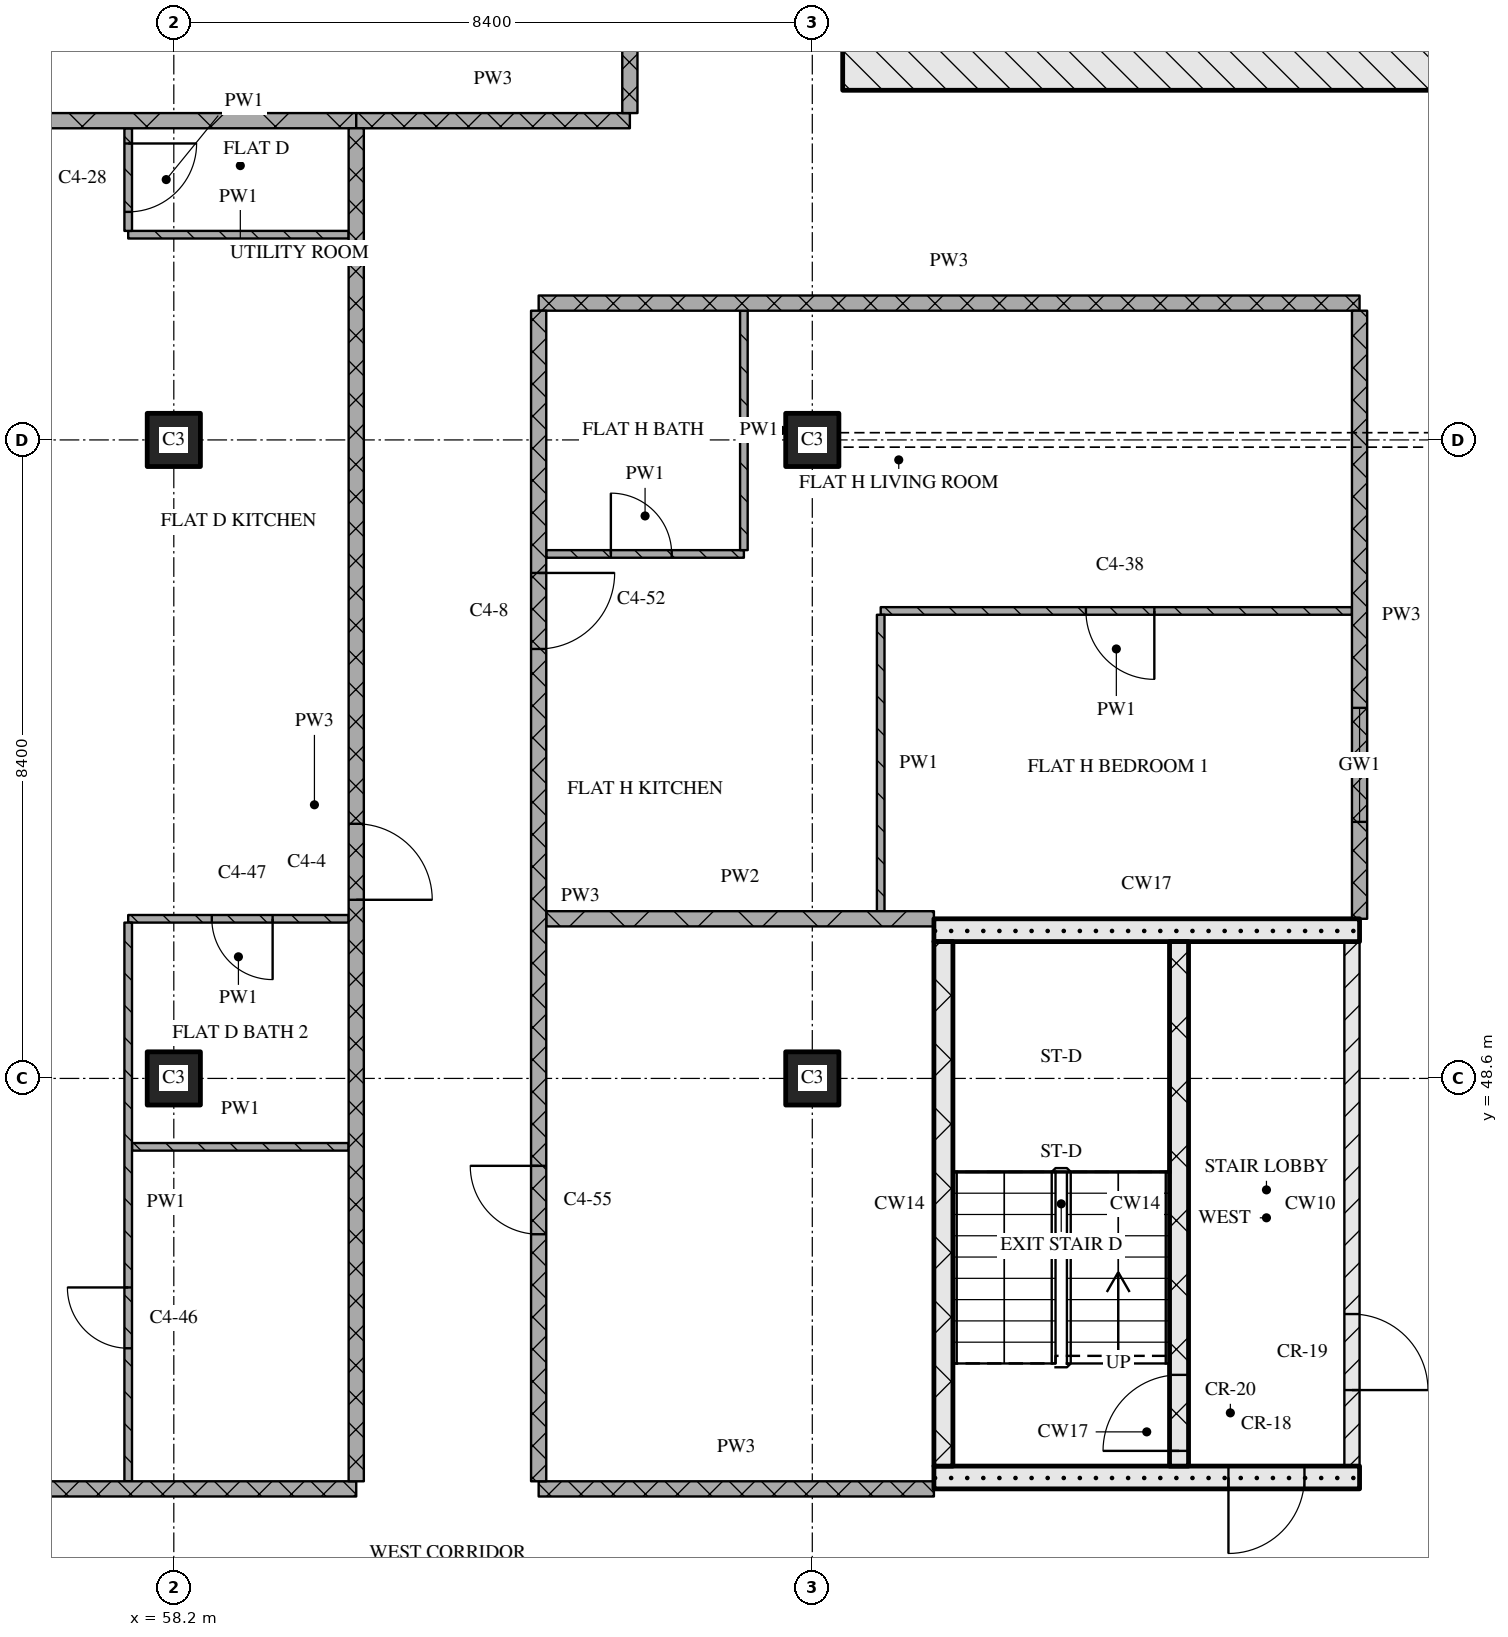
"""IFC4 building model, lengths in metres.
Left out: names, types, materials, properties, quantities, classifications, styles, units other than length and angle.
Written with IfcOpenShell. Run it as: python <this file> out.ifc"""

import sys

from ifc_helpers import new_model, si_unit, direction, frame, frame_2d, origin, origin_2d, place, context, subcontext, project, spatial, rectangle, extrude, element, fill, save


model = new_model("IFC4")
c1 = context("Model", 3, precision=1e-05, world=origin(), true_north=direction((0.0, 1.0)))
c2 = subcontext(c1, "Body", "Model", "MODEL_VIEW")
j1 = project(units=[si_unit("LENGTHUNIT", "METRE"), si_unit("PLANEANGLEUNIT", "RADIAN")], contexts=[c1])
p1 = place(None, origin())
s1 = spatial("IfcSite", under=j1, at=p1, CompositionType="ELEMENT")
p2 = place(p1, origin())
s2 = spatial("IfcBuilding", under=s1, at=p2, CompositionType="ELEMENT")
p3 = place(p2, frame((0.0, 0.0, 183.45)))
s3 = spatial("IfcBuildingStorey", under=s2, at=p3, CompositionType="ELEMENT", Elevation=183.45)
for number, where, z_axis, x_axis in (
    (1, (58.2, 48.6, 0.0), (0.0, 0.0, 1.0), (1.0, 0.0, 0.0)),
    (2, (58.2, 57.0, 0.0), (0.0, 0.0, 1.0), (1.0, 0.0, 0.0)),
    (3, (66.6, 48.6, 0.0), (0.0, 0.0, 1.0), (1.0, 0.0, 0.0)),
    (4, (66.6, 57.0, 0.0), (0.0, 0.0, 1.0), (1.0, 0.0, 0.0)),
):
    element("IfcColumn", number, at=place(p3, frame(where, z_axis=z_axis, x_axis=x_axis)), inside=s3, PredefinedType="COLUMN", context=c2, shape_type="SweptSolid", body=[
        extrude(rectangle(XDim=0.7, YDim=0.7, at=origin_2d()), origin(), (0.0, 0.0, 1.0), 3.6),
    ])
p4 = place(p3, frame((67.0, 62.0, 0.0), z_axis=(0.0, 0.0, 1.0), x_axis=(1.0, 0.0, 0.0)))
e5 = element("IfcWall", 5, at=p4, inside=s3, PredefinedType="SOLIDWALL", context=c2, shape_type="SweptSolid", body=[
    extrude(rectangle(XDim=41.2, YDim=0.8, at=frame_2d((20.6, 0.0))), origin(), (0.0, 0.0, 1.0), 3.32),
])
p5 = place(p4, frame((20.95, 0.0, 0.0)))
e6 = element("IfcOpeningElement", 6, at=p5, cuts=e5, PredefinedType="OPENING", context=c2, shape_type="SweptSolid", body=[
    extrude(rectangle(XDim=1.8, YDim=2.1, at=frame_2d((0.9, 1.05))), frame((0.0, 0.41, 0.0), z_axis=(0.0, -1.0, 0.0), x_axis=(1.0, 0.0, 0.0)), (0.0, 0.0, 1.0), 0.82),
])
p6 = place(p3, frame((68.2, 43.35, 0.0), z_axis=(0.0, 0.0, 1.0), x_axis=(1.0, 0.0, 0.0)))
e7 = element("IfcWall", 7, at=p6, inside=s3, PredefinedType="SOLIDWALL", context=c2, shape_type="SweptSolid", body=[
    extrude(rectangle(XDim=5.6, YDim=0.3, at=frame_2d((2.8, 0.0))), origin(), (0.0, 0.0, 1.0), 3.32),
])
p7 = place(p6, frame((3.875, 0.0, 0.0)))
e8 = element("IfcOpeningElement", 8, at=p7, cuts=e7, PredefinedType="OPENING", context=c2, shape_type="SweptSolid", body=[
    extrude(rectangle(XDim=1.0, YDim=2.1, at=frame_2d((0.5, 1.05))), frame((0.0, 0.16, 0.0), z_axis=(0.0, -1.0, 0.0), x_axis=(1.0, 0.0, 0.0)), (0.0, 0.0, 1.0), 0.32),
])
p8 = place(p3, frame((68.325, 43.5, 0.0), z_axis=(0.0, 0.0, 1.0), x_axis=(0.0, 1.0, 0.0)))
e9 = element("IfcWall", 9, at=p8, inside=s3, PredefinedType="SOLIDWALL", context=c2, shape_type="SweptSolid", body=[
    extrude(rectangle(XDim=6.9, YDim=0.25, at=frame_2d((3.45, 0.0))), origin(), (0.0, 0.0, 1.0), 3.32),
])
p9 = place(p3, frame((71.425, 43.5, 0.0), z_axis=(0.0, 0.0, 1.0), x_axis=(0.0, 1.0, 0.0)))
e10 = element("IfcWall", 10, at=p9, inside=s3, PredefinedType="SOLIDWALL", context=c2, shape_type="SweptSolid", body=[
    extrude(rectangle(XDim=6.9, YDim=0.25, at=frame_2d((3.45, 0.0))), origin(), (0.0, 0.0, 1.0), 3.32),
])
p10 = place(p9, frame((0.2, 0.0, 0.0)))
e11 = element("IfcOpeningElement", 11, at=p10, cuts=e10, PredefinedType="OPENING", context=c2, shape_type="SweptSolid", body=[
    extrude(rectangle(XDim=1.0, YDim=2.1, at=frame_2d((0.5, 1.05))), frame((0.0, 0.135, 0.0), z_axis=(0.0, -1.0, 0.0), x_axis=(1.0, 0.0, 0.0)), (0.0, 0.0, 1.0), 0.27),
])
p11 = place(p3, frame((73.7, 43.5, 0.0), z_axis=(0.0, 0.0, 1.0), x_axis=(0.0, 1.0, 0.0)))
e12 = element("IfcWall", 12, at=p11, inside=s3, PredefinedType="PARTITIONING", context=c2, shape_type="SweptSolid", body=[
    extrude(rectangle(XDim=6.9, YDim=0.2, at=frame_2d((3.45, 0.0))), origin(), (0.0, 0.0, 1.0), 3.32),
])
p12 = place(p11, frame((1.0, 0.0, 0.0)))
e13 = element("IfcOpeningElement", 13, at=p12, cuts=e12, PredefinedType="OPENING", context=c2, shape_type="SweptSolid", body=[
    extrude(rectangle(XDim=1.0, YDim=2.1, at=frame_2d((0.5, 1.05))), frame((0.0, 0.11, 0.0), z_axis=(0.0, -1.0, 0.0), x_axis=(1.0, 0.0, 0.0)), (0.0, 0.0, 1.0), 0.22),
])
p13 = place(p3, frame((68.2, 50.55, 0.0), z_axis=(0.0, 0.0, 1.0), x_axis=(1.0, 0.0, 0.0)))
e14 = element("IfcWall", 14, at=p13, inside=s3, PredefinedType="SOLIDWALL", context=c2, shape_type="SweptSolid", body=[
    extrude(rectangle(XDim=5.6, YDim=0.3, at=frame_2d((2.8, 0.0))), origin(), (0.0, 0.0, 1.0), 3.32),
])
p14 = place(p3, frame((48.28, 43.2, 0.0), z_axis=(0.0, 0.0, 1.0), x_axis=(1.0, 0.0, 0.0)))
e15 = element("IfcWall", 15, at=p14, inside=s3, PredefinedType="PARTITIONING", context=c2, shape_type="SweptSolid", body=[
    extrude(rectangle(XDim=12.32, YDim=0.2, at=frame_2d((6.16, 0.0))), origin(), (0.0, 0.0, 1.0), 3.32),
])
p15 = place(p3, frame((63.0, 43.2, 0.0), z_axis=(0.0, 0.0, 1.0), x_axis=(1.0, 0.0, 0.0)))
e16 = element("IfcWall", 16, at=p15, inside=s3, PredefinedType="PARTITIONING", context=c2, shape_type="SweptSolid", body=[
    extrude(rectangle(XDim=5.2, YDim=0.2, at=frame_2d((2.6, 0.0))), origin(), (0.0, 0.0, 1.0), 3.32),
])
p16 = place(p3, frame((57.65, 47.7, 0.0), z_axis=(0.0, 0.0, 1.0), x_axis=(1.0, 0.0, 0.0)))
e17 = element("IfcWall", 17, at=p16, inside=s3, PredefinedType="PARTITIONING", context=c2, shape_type="SweptSolid", body=[
    extrude(rectangle(XDim=2.85, YDim=0.1, at=frame_2d((1.425, 0.0))), origin(), (0.0, 0.0, 1.0), 3.32),
])
p17 = place(p3, frame((63.1, 50.7, 0.0), z_axis=(0.0, 0.0, 1.0), x_axis=(1.0, 0.0, 0.0)))
e18 = element("IfcWall", 18, at=p17, inside=s3, PredefinedType="PARTITIONING", context=c2, shape_type="SweptSolid", body=[
    extrude(rectangle(XDim=5.1, YDim=0.2, at=frame_2d((2.55, 0.0))), origin(), (0.0, 0.0, 1.0), 3.32),
])
p18 = place(p3, frame((60.5, 50.7, 0.0), z_axis=(0.0, 0.0, 1.0), x_axis=(-1.0, 0.0, 0.0)))
e19 = element("IfcWall", 19, at=p18, inside=s3, PredefinedType="PARTITIONING", context=c2, shape_type="SweptSolid", body=[
    extrude(rectangle(XDim=2.9, YDim=0.1, at=frame_2d((1.45, 0.0))), origin(), (0.0, 0.0, 1.0), 3.32),
])
p19 = place(p18, frame((1.0, 0.0, 0.0)))
e20 = element("IfcOpeningElement", 20, at=p19, cuts=e19, PredefinedType="OPENING", context=c2, shape_type="SweptSolid", body=[
    extrude(rectangle(XDim=0.8, YDim=2.1, at=frame_2d((0.4, 1.05))), frame((0.0, 0.06, 0.0), z_axis=(0.0, -1.0, 0.0), x_axis=(1.0, 0.0, 0.0)), (0.0, 0.0, 1.0), 0.12),
])
p20 = place(p3, frame((73.7, 54.75, 0.0), z_axis=(0.0, 0.0, 1.0), x_axis=(-1.0, 0.0, 0.0)))
e21 = element("IfcWall", 21, at=p20, inside=s3, PredefinedType="PARTITIONING", context=c2, shape_type="SweptSolid", body=[
    extrude(rectangle(XDim=6.2, YDim=0.1, at=frame_2d((3.1, 0.0))), origin(), (0.0, 0.0, 1.0), 3.32),
])
p21 = place(p20, frame((2.6, 0.0, 0.0)))
e22 = element("IfcOpeningElement", 22, at=p21, cuts=e21, PredefinedType="OPENING", context=c2, shape_type="SweptSolid", body=[
    extrude(rectangle(XDim=0.9, YDim=2.1, at=frame_2d((0.45, 1.05))), frame((0.0, 0.06, 0.0), z_axis=(0.0, -1.0, 0.0), x_axis=(1.0, 0.0, 0.0)), (0.0, 0.0, 1.0), 0.12),
])
p22 = place(p3, frame((63.1, 55.5, 0.0), z_axis=(0.0, 0.0, 1.0), x_axis=(1.0, 0.0, 0.0)))
e23 = element("IfcWall", 23, at=p22, inside=s3, PredefinedType="PARTITIONING", context=c2, shape_type="SweptSolid", body=[
    extrude(rectangle(XDim=2.6, YDim=0.1, at=frame_2d((1.3, 0.0))), origin(), (0.0, 0.0, 1.0), 3.32),
])
p23 = place(p22, frame((0.85, 0.0, 0.0)))
e24 = element("IfcOpeningElement", 24, at=p23, cuts=e23, PredefinedType="OPENING", context=c2, shape_type="SweptSolid", body=[
    extrude(rectangle(XDim=0.8, YDim=2.1, at=frame_2d((0.4, 1.05))), frame((0.0, 0.06, 0.0), z_axis=(0.0, -1.0, 0.0), x_axis=(1.0, 0.0, 0.0)), (0.0, 0.0, 1.0), 0.12),
])
p24 = place(p3, frame((63.0, 58.8, 0.0), z_axis=(0.0, 0.0, 1.0), x_axis=(1.0, 0.0, 0.0)))
e25 = element("IfcWall", 25, at=p24, inside=s3, PredefinedType="PARTITIONING", context=c2, shape_type="SweptSolid", body=[
    extrude(rectangle(XDim=10.8, YDim=0.2, at=frame_2d((5.4, 0.0))), origin(), (0.0, 0.0, 1.0), 3.32),
])
p25 = place(p3, frame((57.6, 59.7, 0.0), z_axis=(0.0, 0.0, 1.0), x_axis=(1.0, 0.0, 0.0)))
e26 = element("IfcWall", 26, at=p25, inside=s3, PredefinedType="PARTITIONING", context=c2, shape_type="SweptSolid", body=[
    extrude(rectangle(XDim=2.9, YDim=0.1, at=frame_2d((1.45, 0.0))), origin(), (0.0, 0.0, 1.0), 3.32),
])
p26 = place(p3, frame((60.6, 61.2, 0.0), z_axis=(0.0, 0.0, 1.0), x_axis=(1.0, 0.0, 0.0)))
e27 = element("IfcWall", 27, at=p26, inside=s3, PredefinedType="PARTITIONING", context=c2, shape_type="SweptSolid", body=[
    extrude(rectangle(XDim=3.6, YDim=0.2, at=frame_2d((1.8, 0.0))), origin(), (0.0, 0.0, 1.0), 3.32),
])
p27 = place(p3, frame((48.28, 61.2, 0.0), z_axis=(0.0, 0.0, 1.0), x_axis=(1.0, 0.0, 0.0)))
e28 = element("IfcWall", 28, at=p27, inside=s3, PredefinedType="PARTITIONING", context=c2, shape_type="SweptSolid", body=[
    extrude(rectangle(XDim=12.32, YDim=0.2, at=frame_2d((6.16, 0.0))), origin(), (0.0, 0.0, 1.0), 3.32),
])
p28 = place(p3, frame((57.6, 50.65, 0.0), z_axis=(0.0, 0.0, 1.0), x_axis=(0.0, -1.0, 0.0)))
e29 = element("IfcWall", 29, at=p28, inside=s3, PredefinedType="PARTITIONING", context=c2, shape_type="SweptSolid", body=[
    extrude(rectangle(XDim=7.35, YDim=0.1, at=frame_2d((3.675, 0.0))), origin(), (0.0, 0.0, 1.0), 3.32),
])
p29 = place(p28, frame((4.8, 0.0, 0.0)))
e30 = element("IfcOpeningElement", 30, at=p29, cuts=e29, PredefinedType="OPENING", context=c2, shape_type="SweptSolid", body=[
    extrude(rectangle(XDim=0.8, YDim=2.1, at=frame_2d((0.4, 1.05))), frame((0.0, 0.06, 0.0), z_axis=(0.0, -1.0, 0.0), x_axis=(1.0, 0.0, 0.0)), (0.0, 0.0, 1.0), 0.12),
])
p30 = place(p3, frame((57.6, 61.1, 0.0), z_axis=(0.0, 0.0, 1.0), x_axis=(0.0, -1.0, 0.0)))
e31 = element("IfcWall", 31, at=p30, inside=s3, PredefinedType="PARTITIONING", context=c2, shape_type="SweptSolid", body=[
    extrude(rectangle(XDim=1.35, YDim=0.1, at=frame_2d((0.675, 0.0))), origin(), (0.0, 0.0, 1.0), 3.32),
])
p31 = place(p30, frame((0.2, 0.0, 0.0)))
e32 = element("IfcOpeningElement", 32, at=p31, cuts=e31, PredefinedType="OPENING", context=c2, shape_type="SweptSolid", body=[
    extrude(rectangle(XDim=0.9, YDim=2.1, at=frame_2d((0.45, 1.05))), frame((0.0, 0.06, 0.0), z_axis=(0.0, -1.0, 0.0), x_axis=(1.0, 0.0, 0.0)), (0.0, 0.0, 1.0), 0.12),
])
p32 = place(p3, frame((60.6, 43.3, 0.0), z_axis=(0.0, 0.0, 1.0), x_axis=(0.0, 1.0, 0.0)))
e33 = element("IfcWall", 33, at=p32, inside=s3, PredefinedType="PARTITIONING", context=c2, shape_type="SweptSolid", body=[
    extrude(rectangle(XDim=17.8, YDim=0.2, at=frame_2d((8.9, 0.0))), origin(), (0.0, 0.0, 1.0), 3.32),
])
p33 = place(p32, frame((7.65, 0.0, 0.0)))
e34 = element("IfcOpeningElement", 34, at=p33, cuts=e33, PredefinedType="OPENING", context=c2, shape_type="SweptSolid", body=[
    extrude(rectangle(XDim=1.0, YDim=2.1, at=frame_2d((0.5, 1.05))), frame((0.0, 0.11, 0.0), z_axis=(0.0, -1.0, 0.0), x_axis=(1.0, 0.0, 0.0)), (0.0, 0.0, 1.0), 0.22),
])
p34 = place(p3, frame((63.0, 58.7, 0.0), z_axis=(0.0, 0.0, 1.0), x_axis=(0.0, -1.0, 0.0)))
e35 = element("IfcWall", 35, at=p34, inside=s3, PredefinedType="PARTITIONING", context=c2, shape_type="SweptSolid", body=[
    extrude(rectangle(XDim=15.4, YDim=0.2, at=frame_2d((7.7, 0.0))), origin(), (0.0, 0.0, 1.0), 3.32),
])
p35 = place(p34, frame((3.45, 0.0, 0.0)))
e36 = element("IfcOpeningElement", 36, at=p35, cuts=e35, PredefinedType="OPENING", context=c2, shape_type="SweptSolid", body=[
    extrude(rectangle(XDim=1.0, YDim=2.1, at=frame_2d((0.5, 1.05))), frame((0.0, 0.11, 0.0), z_axis=(0.0, -1.0, 0.0), x_axis=(1.0, 0.0, 0.0)), (0.0, 0.0, 1.0), 0.22),
])
p36 = place(p34, frame((11.25, 0.0, 0.0)))
e37 = element("IfcOpeningElement", 37, at=p36, cuts=e35, PredefinedType="OPENING", context=c2, shape_type="SweptSolid", body=[
    extrude(rectangle(XDim=0.9, YDim=2.1, at=frame_2d((0.45, 1.05))), frame((0.0, 0.11, 0.0), z_axis=(0.0, -1.0, 0.0), x_axis=(1.0, 0.0, 0.0)), (0.0, 0.0, 1.0), 0.22),
])
p37 = place(p3, frame((64.2, 61.3, 0.0), z_axis=(0.0, 0.0, 1.0), x_axis=(0.0, 1.0, 0.0)))
e38 = element("IfcWall", 38, at=p37, inside=s3, PredefinedType="PARTITIONING", context=c2, shape_type="SweptSolid", body=[
    extrude(rectangle(XDim=14.02, YDim=0.2, at=frame_2d((7.01, 0.0))), origin(), (0.0, 0.0, 1.0), 3.32),
])
p38 = place(p37, frame((3.45, 0.0, 0.0)))
e39 = element("IfcOpeningElement", 39, at=p38, cuts=e38, PredefinedType="OPENING", context=c2, shape_type="SweptSolid", body=[
    extrude(rectangle(XDim=1.0, YDim=2.1, at=frame_2d((0.5, 1.05))), frame((0.0, 0.11, 0.0), z_axis=(0.0, -1.0, 0.0), x_axis=(1.0, 0.0, 0.0)), (0.0, 0.0, 1.0), 0.22),
])
p39 = place(p3, frame((65.7, 58.7, 0.0), z_axis=(0.0, 0.0, 1.0), x_axis=(0.0, -1.0, 0.0)))
e40 = element("IfcWall", 40, at=p39, inside=s3, PredefinedType="PARTITIONING", context=c2, shape_type="SweptSolid", body=[
    extrude(rectangle(XDim=3.15, YDim=0.1, at=frame_2d((1.575, 0.0))), origin(), (0.0, 0.0, 1.0), 3.32),
])
p40 = place(p3, frame((67.5, 54.7, 0.0), z_axis=(0.0, 0.0, 1.0), x_axis=(0.0, -1.0, 0.0)))
e41 = element("IfcWall", 41, at=p40, inside=s3, PredefinedType="PARTITIONING", context=c2, shape_type="SweptSolid", body=[
    extrude(rectangle(XDim=3.9, YDim=0.1, at=frame_2d((1.95, 0.0))), origin(), (0.0, 0.0, 1.0), 3.32),
])
p41 = place(p3, frame((73.8, 58.7, 0.0), z_axis=(0.0, 0.0, 1.0), x_axis=(0.0, -1.0, 0.0)))
e42 = element("IfcWall", 42, at=p41, inside=s3, PredefinedType="PARTITIONING", context=c2, shape_type="SweptSolid", body=[
    extrude(rectangle(XDim=8.0, YDim=0.2, at=frame_2d((4.0, 0.0))), origin(), (0.0, 0.0, 1.0), 3.32),
])
p42 = place(p41, frame((5.225, 0.0, 0.9)))
e43 = element("IfcOpeningElement", 43, at=p42, cuts=e42, PredefinedType="OPENING", context=c2, shape_type="SweptSolid", body=[
    extrude(rectangle(XDim=1.5, YDim=1.5, at=frame_2d((0.75, 0.75))), frame((0.0, 0.11, 0.0), z_axis=(0.0, -1.0, 0.0), x_axis=(1.0, 0.0, 0.0)), (0.0, 0.0, 1.0), 0.22),
])
p43 = place(p7, origin())
e44 = element("IfcDoor", 44, at=p43, inside=s3, OperationType="SINGLE_SWING_RIGHT", PredefinedType="DOOR", context=c2, shape_type="SweptSolid", body=[
    extrude(rectangle(XDim=1.0, YDim=2.1, at=frame_2d((0.5, 1.05))), frame((0.0, 0.025, 0.0), z_axis=(0.0, -1.0, 0.0), x_axis=(1.0, 0.0, 0.0)), (0.0, 0.0, 1.0), 0.05),
])
fill(e8, e44)
p44 = place(p10, origin())
e45 = element("IfcDoor", 45, at=p44, inside=s3, OperationType="SINGLE_SWING_LEFT", PredefinedType="DOOR", context=c2, shape_type="SweptSolid", body=[
    extrude(rectangle(XDim=1.0, YDim=2.1, at=frame_2d((0.5, 1.05))), frame((0.0, 0.025, 0.0), z_axis=(0.0, -1.0, 0.0), x_axis=(1.0, 0.0, 0.0)), (0.0, 0.0, 1.0), 0.05),
])
fill(e11, e45)
p45 = place(p12, origin())
e46 = element("IfcDoor", 46, at=p45, inside=s3, OperationType="SINGLE_SWING_RIGHT", PredefinedType="DOOR", context=c2, shape_type="SweptSolid", body=[
    extrude(rectangle(XDim=1.0, YDim=2.1, at=frame_2d((0.5, 1.05))), frame((0.0, 0.025, 0.0), z_axis=(0.0, -1.0, 0.0), x_axis=(1.0, 0.0, 0.0)), (0.0, 0.0, 1.0), 0.05),
])
fill(e13, e46)
p46 = place(p19, origin())
e47 = element("IfcDoor", 47, at=p46, inside=s3, OperationType="SINGLE_SWING_LEFT", PredefinedType="DOOR", context=c2, shape_type="SweptSolid", body=[
    extrude(rectangle(XDim=0.8, YDim=2.1, at=frame_2d((0.4, 1.05))), frame((0.0, 0.025, 0.0), z_axis=(0.0, -1.0, 0.0), x_axis=(1.0, 0.0, 0.0)), (0.0, 0.0, 1.0), 0.05),
])
fill(e20, e47)
p47 = place(p21, origin())
e48 = element("IfcDoor", 48, at=p47, inside=s3, OperationType="SINGLE_SWING_LEFT", PredefinedType="DOOR", context=c2, shape_type="SweptSolid", body=[
    extrude(rectangle(XDim=0.9, YDim=2.1, at=frame_2d((0.45, 1.05))), frame((0.0, 0.025, 0.0), z_axis=(0.0, -1.0, 0.0), x_axis=(1.0, 0.0, 0.0)), (0.0, 0.0, 1.0), 0.05),
])
fill(e22, e48)
p48 = place(p23, origin())
e49 = element("IfcDoor", 49, at=p48, inside=s3, OperationType="SINGLE_SWING_LEFT", PredefinedType="DOOR", context=c2, shape_type="SweptSolid", body=[
    extrude(rectangle(XDim=0.8, YDim=2.1, at=frame_2d((0.4, 1.05))), frame((0.0, 0.025, 0.0), z_axis=(0.0, -1.0, 0.0), x_axis=(1.0, 0.0, 0.0)), (0.0, 0.0, 1.0), 0.05),
])
fill(e24, e49)
p49 = place(p29, origin())
e50 = element("IfcDoor", 50, at=p49, inside=s3, OperationType="SINGLE_SWING_RIGHT", PredefinedType="DOOR", context=c2, shape_type="SweptSolid", body=[
    extrude(rectangle(XDim=0.8, YDim=2.1, at=frame_2d((0.4, 1.05))), frame((0.0, 0.025, 0.0), z_axis=(0.0, -1.0, 0.0), x_axis=(1.0, 0.0, 0.0)), (0.0, 0.0, 1.0), 0.05),
])
fill(e30, e50)
p50 = place(p31, origin())
e51 = element("IfcDoor", 51, at=p50, inside=s3, OperationType="SINGLE_SWING_LEFT", PredefinedType="DOOR", context=c2, shape_type="SweptSolid", body=[
    extrude(rectangle(XDim=0.9, YDim=2.1, at=frame_2d((0.45, 1.05))), frame((0.0, 0.025, 0.0), z_axis=(0.0, -1.0, 0.0), x_axis=(1.0, 0.0, 0.0)), (0.0, 0.0, 1.0), 0.05),
])
fill(e32, e51)
p51 = place(p33, origin())
e52 = element("IfcDoor", 52, at=p51, inside=s3, OperationType="SINGLE_SWING_RIGHT", PredefinedType="DOOR", context=c2, shape_type="SweptSolid", body=[
    extrude(rectangle(XDim=1.0, YDim=2.1, at=frame_2d((0.5, 1.05))), frame((0.0, 0.025, 0.0), z_axis=(0.0, -1.0, 0.0), x_axis=(1.0, 0.0, 0.0)), (0.0, 0.0, 1.0), 0.05),
])
fill(e34, e52)
p52 = place(p35, origin())
e53 = element("IfcDoor", 53, at=p52, inside=s3, OperationType="SINGLE_SWING_LEFT", PredefinedType="DOOR", context=c2, shape_type="SweptSolid", body=[
    extrude(rectangle(XDim=1.0, YDim=2.1, at=frame_2d((0.5, 1.05))), frame((0.0, 0.025, 0.0), z_axis=(0.0, -1.0, 0.0), x_axis=(1.0, 0.0, 0.0)), (0.0, 0.0, 1.0), 0.05),
])
fill(e36, e53)
p53 = place(p36, origin())
e54 = element("IfcDoor", 54, at=p53, inside=s3, OperationType="SINGLE_SWING_RIGHT", PredefinedType="DOOR", context=c2, shape_type="SweptSolid", body=[
    extrude(rectangle(XDim=0.9, YDim=2.1, at=frame_2d((0.45, 1.05))), frame((0.0, 0.025, 0.0), z_axis=(0.0, -1.0, 0.0), x_axis=(1.0, 0.0, 0.0)), (0.0, 0.0, 1.0), 0.05),
])
fill(e37, e54)
p54 = place(p42, origin())
e55 = element("IfcWindow", 55, at=p54, inside=s3, PartitioningType="SINGLE_PANEL", PredefinedType="WINDOW", context=c2, shape_type="SweptSolid", body=[
    extrude(rectangle(XDim=1.5, YDim=1.5, at=frame_2d((0.75, 0.75))), frame((0.0, 0.03, 0.0), z_axis=(0.0, -1.0, 0.0), x_axis=(1.0, 0.0, 0.0)), (0.0, 0.0, 1.0), 0.06),
])
fill(e43, e55)
save(model, sys.argv[1])
